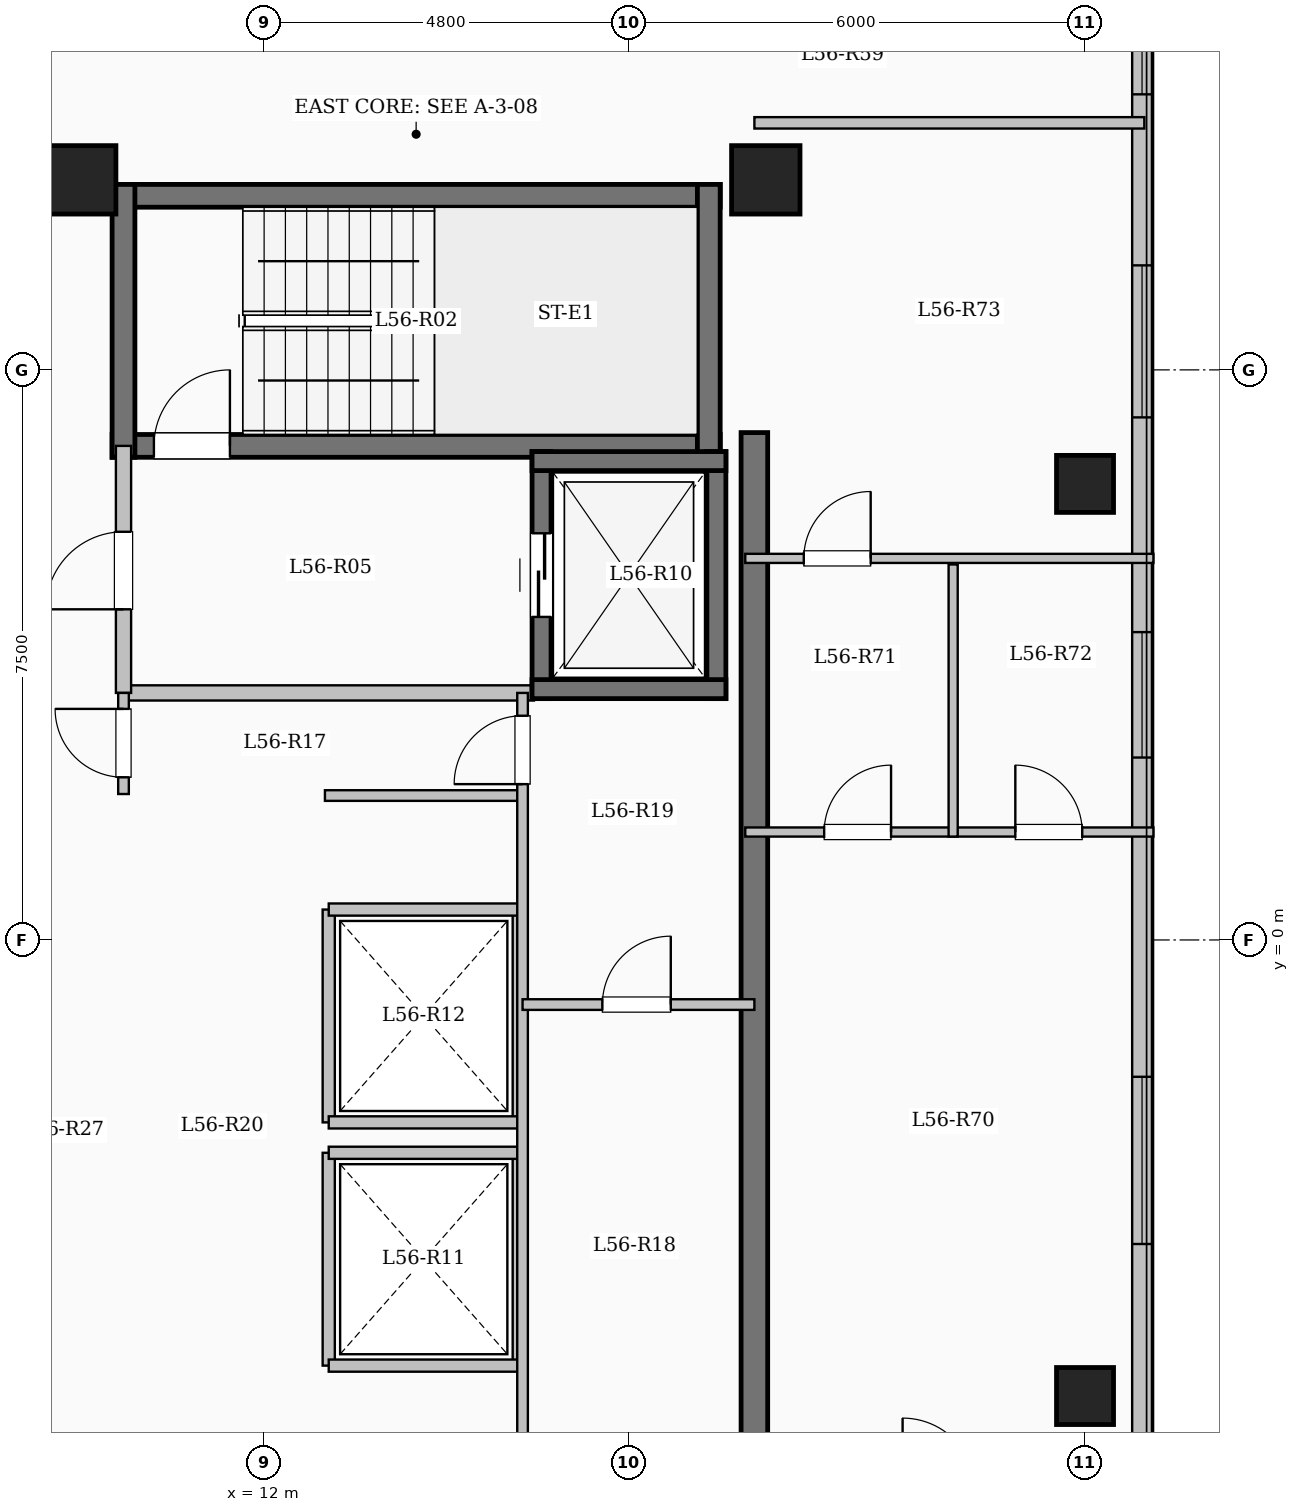
"""IFC4 building model, lengths in metres.
Left out: names, types, materials, properties, quantities, classifications, styles, units other than length and angle.
Written with IfcOpenShell. Run it as: python <this file> out.ifc"""

import sys

from ifc_helpers import new_model, si_unit, direction, frame, frame_2d, origin, origin_2d, place, context, subcontext, project, spatial, rectangle, extrude, element, fill, save


model = new_model("IFC4")
c1 = context("Model", 3, precision=1e-05, world=origin(), true_north=direction((0.0, 1.0)))
c2 = subcontext(c1, "Body", "Model", "MODEL_VIEW")
j1 = project(units=[si_unit("LENGTHUNIT", "METRE"), si_unit("PLANEANGLEUNIT", "RADIAN")], contexts=[c1])
p1 = place(None, origin())
s1 = spatial("IfcSite", under=j1, at=p1, CompositionType="ELEMENT")
p2 = place(p1, origin())
s2 = spatial("IfcBuilding", under=s1, at=p2, CompositionType="ELEMENT")
p3 = place(p2, frame((0.0, 0.0, 207.0)))
s3 = spatial("IfcBuildingStorey", under=s2, at=p3, CompositionType="ELEMENT", Elevation=207.0)
for number, where, z_axis, x_axis in (
    (1, (9.6, 10.0, 0.0), (0.0, 0.0, 1.0), (1.0, 0.0, 0.0)),
    (2, (18.6, 10.0, 0.0), (0.0, 0.0, 1.0), (1.0, 0.0, 0.0)),
):
    element("IfcColumn", number, at=place(p3, frame(where, z_axis=z_axis, x_axis=x_axis)), inside=s3, PredefinedType="COLUMN", context=c2, shape_type="SweptSolid", body=[
        extrude(rectangle(XDim=0.9, YDim=0.9, at=origin_2d()), origin(), (0.0, 0.0, 1.0), 3.35),
    ])
for number, where, z_axis, x_axis in (
    (3, (22.8, -6.0, 0.0), (0.0, 0.0, 1.0), (1.0, 0.0, 0.0)),
    (4, (22.8, 6.0, 0.0), (0.0, 0.0, 1.0), (1.0, 0.0, 0.0)),
):
    element("IfcColumn", number, at=place(p3, frame(where, z_axis=z_axis, x_axis=x_axis)), inside=s3, PredefinedType="COLUMN", context=c2, shape_type="SweptSolid", body=[
        extrude(rectangle(XDim=0.75, YDim=0.75, at=origin_2d()), origin(), (0.0, 0.0, 1.0), 3.35),
    ])
p4 = place(p3, frame((23.55, 17.25, 0.0), z_axis=(0.0, 0.0, 1.0), x_axis=(0.0, -1.0, 0.0)))
e5 = element("IfcWall", 5, at=p4, inside=s3, PredefinedType="SOLIDWALL", context=c2, shape_type="SweptSolid", body=[
    extrude(rectangle(XDim=34.5, YDim=0.26, at=frame_2d((17.25, 0.0))), origin(), (0.0, 0.0, 1.0), 3.1),
])
p5 = place(p4, frame((1.375, 0.0, 0.9)))
e6 = element("IfcOpeningElement", 6, at=p5, cuts=e5, PredefinedType="OPENING", context=c2, shape_type="SweptSolid", body=[
    extrude(rectangle(XDim=2.0, YDim=1.7, at=frame_2d((1.0, 0.85))), frame((0.0, 0.14, 0.0), z_axis=(0.0, -1.0, 0.0), x_axis=(1.0, 0.0, 0.0)), (0.0, 0.0, 1.0), 0.28),
])
p6 = place(p4, frame((5.125, 0.0, 0.95)))
e7 = element("IfcOpeningElement", 7, at=p6, cuts=e5, PredefinedType="OPENING", context=c2, shape_type="SweptSolid", body=[
    extrude(rectangle(XDim=1.0, YDim=1.5, at=frame_2d((0.5, 0.75))), frame((0.0, 0.14, 0.0), z_axis=(0.0, -1.0, 0.0), x_axis=(1.0, 0.0, 0.0)), (0.0, 0.0, 1.0), 0.28),
])
p7 = place(p4, frame((8.375, 0.0, 0.9)))
e8 = element("IfcOpeningElement", 8, at=p7, cuts=e5, PredefinedType="OPENING", context=c2, shape_type="SweptSolid", body=[
    extrude(rectangle(XDim=2.0, YDim=1.7, at=frame_2d((1.0, 0.85))), frame((0.0, 0.14, 0.0), z_axis=(0.0, -1.0, 0.0), x_axis=(1.0, 0.0, 0.0)), (0.0, 0.0, 1.0), 0.28),
])
p8 = place(p4, frame((13.2, 0.0, 0.9)))
e9 = element("IfcOpeningElement", 9, at=p8, cuts=e5, PredefinedType="OPENING", context=c2, shape_type="SweptSolid", body=[
    extrude(rectangle(XDim=1.65, YDim=1.6, at=frame_2d((0.825, 0.8))), frame((0.0, 0.14, 0.0), z_axis=(0.0, -1.0, 0.0), x_axis=(1.0, 0.0, 0.0)), (0.0, 0.0, 1.0), 0.28),
])
p9 = place(p4, frame((19.05, 0.0, 0.9)))
e10 = element("IfcOpeningElement", 10, at=p9, cuts=e5, PredefinedType="OPENING", context=c2, shape_type="SweptSolid", body=[
    extrude(rectangle(XDim=2.2, YDim=1.75, at=frame_2d((1.1, 0.875))), frame((0.0, 0.14, 0.0), z_axis=(0.0, -1.0, 0.0), x_axis=(1.0, 0.0, 0.0)), (0.0, 0.0, 1.0), 0.28),
])
p10 = place(p4, frame((24.975, 0.0, 0.95)))
e11 = element("IfcOpeningElement", 11, at=p10, cuts=e5, PredefinedType="OPENING", context=c2, shape_type="SweptSolid", body=[
    extrude(rectangle(XDim=1.2, YDim=1.5, at=frame_2d((0.6, 0.75))), frame((0.0, 0.14, 0.0), z_axis=(0.0, -1.0, 0.0), x_axis=(1.0, 0.0, 0.0)), (0.0, 0.0, 1.0), 0.28),
])
p11 = place(p4, frame((29.475, 0.0, 0.9)))
e12 = element("IfcOpeningElement", 12, at=p11, cuts=e5, PredefinedType="OPENING", context=c2, shape_type="SweptSolid", body=[
    extrude(rectangle(XDim=2.2, YDim=1.75, at=frame_2d((1.1, 0.875))), frame((0.0, 0.14, 0.0), z_axis=(0.0, -1.0, 0.0), x_axis=(1.0, 0.0, 0.0)), (0.0, 0.0, 1.0), 0.28),
])
p12 = place(p3, frame((10.0, 9.79, 0.0), z_axis=(0.0, 0.0, 1.0), x_axis=(1.0, 0.0, 0.0)))
e13 = element("IfcWall", 13, at=p12, inside=s3, PredefinedType="SHEAR", context=c2, shape_type="SweptSolid", body=[
    extrude(rectangle(XDim=8.0, YDim=0.3, at=frame_2d((4.0, 0.0))), origin(), (0.0, 0.0, 1.0), 3.35),
])
p13 = place(p3, frame((10.0, 6.5, 0.0), z_axis=(0.0, 0.0, 1.0), x_axis=(1.0, 0.0, 0.0)))
e14 = element("IfcWall", 14, at=p13, inside=s3, PredefinedType="SHEAR", context=c2, shape_type="SweptSolid", body=[
    extrude(rectangle(XDim=8.0, YDim=0.3, at=frame_2d((4.0, 0.0))), origin(), (0.0, 0.0, 1.0), 3.35),
])
p14 = place(p13, frame((0.55, 0.0, 0.0)))
e15 = element("IfcOpeningElement", 15, at=p14, cuts=e14, PredefinedType="OPENING", context=c2, shape_type="SweptSolid", body=[
    extrude(rectangle(XDim=1.0, YDim=2.15, at=frame_2d((0.5, 1.075))), frame((0.0, 0.16, 0.0), z_axis=(0.0, -1.0, 0.0), x_axis=(1.0, 0.0, 0.0)), (0.0, 0.0, 1.0), 0.32),
])
for number, where, z_axis, x_axis in (
    (16, (10.15, 6.35, 0.0), (0.0, 0.0, 1.0), (0.0, 1.0, 0.0)),
    (17, (17.85, 6.35, 0.0), (0.0, 0.0, 1.0), (0.0, 1.0, 0.0)),
):
    element("IfcWall", number, at=place(p3, frame(where, z_axis=z_axis, x_axis=x_axis)), inside=s3, PredefinedType="SHEAR", context=c2, shape_type="SweptSolid", body=[
        extrude(rectangle(XDim=3.59, YDim=0.3, at=frame_2d((1.795, 0.0))), origin(), (0.0, 0.0, 1.0), 3.35),
    ])
p15 = place(p3, frame((10.15, 3.25, 0.0), z_axis=(0.0, 0.0, 1.0), x_axis=(1.0, 0.0, 0.0)))
e18 = element("IfcWall", 18, at=p15, inside=s3, PredefinedType="SOLIDWALL", context=c2, shape_type="SweptSolid", body=[
    extrude(rectangle(XDim=5.4, YDim=0.2, at=frame_2d((2.7, 0.0))), origin(), (0.0, 0.0, 1.0), 3.1),
])
p16 = place(p3, frame((10.15, 3.25, 0.0), z_axis=(0.0, 0.0, 1.0), x_axis=(0.0, 1.0, 0.0)))
e19 = element("IfcWall", 19, at=p16, inside=s3, PredefinedType="SOLIDWALL", context=c2, shape_type="SweptSolid", body=[
    extrude(rectangle(XDim=3.25, YDim=0.2, at=frame_2d((1.625, 0.0))), origin(), (0.0, 0.0, 1.0), 3.1),
])
p17 = place(p16, frame((1.1, 0.0, 0.0)))
e20 = element("IfcOpeningElement", 20, at=p17, cuts=e19, PredefinedType="OPENING", context=c2, shape_type="SweptSolid", body=[
    extrude(rectangle(XDim=1.02, YDim=2.15, at=frame_2d((0.51, 1.075))), frame((0.0, 0.11, 0.0), z_axis=(0.0, -1.0, 0.0), x_axis=(1.0, 0.0, 0.0)), (0.0, 0.0, 1.0), 0.22),
])
p18 = place(p3, frame((15.65, 3.175, 0.0), z_axis=(0.0, 0.0, 1.0), x_axis=(0.0, 1.0, 0.0)))
e21 = element("IfcWall", 21, at=p18, inside=s3, PredefinedType="SHEAR", context=c2, shape_type="SweptSolid", body=[
    extrude(rectangle(XDim=3.25, YDim=0.25, at=frame_2d((1.625, 0.0))), origin(), (0.0, 0.0, 1.0), 3.35),
])
p19 = place(p18, frame((1.075, 0.0, 0.0)))
e22 = element("IfcOpeningElement", 22, at=p19, cuts=e21, PredefinedType="OPENING", context=c2, shape_type="SweptSolid", body=[
    extrude(rectangle(XDim=1.1, YDim=2.15, at=frame_2d((0.55, 1.075))), frame((0.0, 0.135, 0.0), z_axis=(0.0, -1.0, 0.0), x_axis=(1.0, 0.0, 0.0)), (0.0, 0.0, 1.0), 0.27),
])
p20 = place(p3, frame((17.95, 3.175, 0.0), z_axis=(0.0, 0.0, 1.0), x_axis=(0.0, 1.0, 0.0)))
e23 = element("IfcWall", 23, at=p20, inside=s3, PredefinedType="SHEAR", context=c2, shape_type="SweptSolid", body=[
    extrude(rectangle(XDim=3.25, YDim=0.25, at=frame_2d((1.625, 0.0))), origin(), (0.0, 0.0, 1.0), 3.35),
])
for number, where, z_axis, x_axis in (
    (24, (15.525, 3.3, 0.0), (0.0, 0.0, 1.0), (1.0, 0.0, 0.0)),
    (25, (15.525, 6.3, 0.0), (0.0, 0.0, 1.0), (1.0, 0.0, 0.0)),
):
    element("IfcWall", number, at=place(p3, frame(where, z_axis=z_axis, x_axis=x_axis)), inside=s3, PredefinedType="SHEAR", context=c2, shape_type="SweptSolid", body=[
        extrude(rectangle(XDim=2.55, YDim=0.25, at=frame_2d((1.275, 0.0))), origin(), (0.0, 0.0, 1.0), 3.35),
    ])
for number, where, z_axis, x_axis in (
    (26, (12.85, -5.6, 0.0), (0.0, 0.0, 1.0), (0.0, 1.0, 0.0)),
    (27, (15.35, -5.6, 0.0), (0.0, 0.0, 1.0), (0.0, 1.0, 0.0)),
):
    element("IfcWall", number, at=place(p3, frame(where, z_axis=z_axis, x_axis=x_axis)), inside=s3, PredefinedType="SOLIDWALL", context=c2, shape_type="SweptSolid", body=[
        extrude(rectangle(XDim=2.8, YDim=0.16, at=frame_2d((1.4, 0.0))), origin(), (0.0, 0.0, 1.0), 3.1),
    ])
for number, where, z_axis, x_axis in (
    (28, (12.85, -5.6, 0.0), (0.0, 0.0, 1.0), (1.0, 0.0, 0.0)),
    (29, (12.85, -2.8, 0.0), (0.0, 0.0, 1.0), (1.0, 0.0, 0.0)),
):
    element("IfcWall", number, at=place(p3, frame(where, z_axis=z_axis, x_axis=x_axis)), inside=s3, PredefinedType="SOLIDWALL", context=c2, shape_type="SweptSolid", body=[
        extrude(rectangle(XDim=2.5, YDim=0.16, at=frame_2d((1.25, 0.0))), origin(), (0.0, 0.0, 1.0), 3.1),
    ])
for number, where, z_axis, x_axis in (
    (30, (12.85, -2.4, 0.0), (0.0, 0.0, 1.0), (0.0, 1.0, 0.0)),
    (31, (15.35, -2.4, 0.0), (0.0, 0.0, 1.0), (0.0, 1.0, 0.0)),
):
    element("IfcWall", number, at=place(p3, frame(where, z_axis=z_axis, x_axis=x_axis)), inside=s3, PredefinedType="SOLIDWALL", context=c2, shape_type="SweptSolid", body=[
        extrude(rectangle(XDim=2.8, YDim=0.16, at=frame_2d((1.4, 0.0))), origin(), (0.0, 0.0, 1.0), 3.1),
    ])
for number, where, z_axis, x_axis in (
    (32, (12.85, -2.4, 0.0), (0.0, 0.0, 1.0), (1.0, 0.0, 0.0)),
    (33, (12.85, 0.4, 0.0), (0.0, 0.0, 1.0), (1.0, 0.0, 0.0)),
):
    element("IfcWall", number, at=place(p3, frame(where, z_axis=z_axis, x_axis=x_axis)), inside=s3, PredefinedType="SOLIDWALL", context=c2, shape_type="SweptSolid", body=[
        extrude(rectangle(XDim=2.5, YDim=0.16, at=frame_2d((1.25, 0.0))), origin(), (0.0, 0.0, 1.0), 3.1),
    ])
p21 = place(p3, frame((18.45, -7.375, 0.0), z_axis=(0.0, 0.0, 1.0), x_axis=(0.0, 1.0, 0.0)))
e34 = element("IfcWall", 34, at=p21, inside=s3, PredefinedType="SHEAR", context=c2, shape_type="SweptSolid", body=[
    extrude(rectangle(XDim=14.05, YDim=0.35, at=frame_2d((7.025, 0.0))), origin(), (0.0, 0.0, 1.0), 3.35),
])
p22 = place(p3, frame((12.8, 1.9, 0.0), z_axis=(0.0, 0.0, 1.0), x_axis=(1.0, 0.0, 0.0)))
e35 = element("IfcWall", 35, at=p22, inside=s3, PredefinedType="PARTITIONING", context=c2, shape_type="SweptSolid", body=[
    extrude(rectangle(XDim=2.6, YDim=0.14, at=frame_2d((1.3, 0.0))), origin(), (0.0, 0.0, 1.0), 3.1),
])
p23 = place(p3, frame((10.15, 1.92, 0.0), z_axis=(0.0, 0.0, 1.0), x_axis=(0.0, 1.0, 0.0)))
e36 = element("IfcWall", 36, at=p23, inside=s3, PredefinedType="PARTITIONING", context=c2, shape_type="SweptSolid", body=[
    extrude(rectangle(XDim=1.33, YDim=0.14, at=frame_2d((0.665, 0.0))), origin(), (0.0, 0.0, 1.0), 3.1),
])
p24 = place(p23, frame((0.22, 0.0, 0.0)))
e37 = element("IfcOpeningElement", 37, at=p24, cuts=e36, PredefinedType="OPENING", context=c2, shape_type="SweptSolid", body=[
    extrude(rectangle(XDim=0.9, YDim=2.08, at=frame_2d((0.45, 1.04))), frame((0.0, 0.08, 0.0), z_axis=(0.0, -1.0, 0.0), x_axis=(1.0, 0.0, 0.0)), (0.0, 0.0, 1.0), 0.16),
])
p25 = place(p3, frame((15.4, -7.2, 0.0), z_axis=(0.0, 0.0, 1.0), x_axis=(0.0, 1.0, 0.0)))
e38 = element("IfcWall", 38, at=p25, inside=s3, PredefinedType="PARTITIONING", context=c2, shape_type="SweptSolid", body=[
    extrude(rectangle(XDim=10.45, YDim=0.14, at=frame_2d((5.225, 0.0))), origin(), (0.0, 0.0, 1.0), 3.1),
])
p26 = place(p25, frame((9.25, 0.0, 0.0)))
e39 = element("IfcOpeningElement", 39, at=p26, cuts=e38, PredefinedType="OPENING", context=c2, shape_type="SweptSolid", body=[
    extrude(rectangle(XDim=0.9, YDim=2.08, at=frame_2d((0.45, 1.04))), frame((0.0, 0.08, 0.0), z_axis=(0.0, -1.0, 0.0), x_axis=(1.0, 0.0, 0.0)), (0.0, 0.0, 1.0), 0.16),
])
p27 = place(p3, frame((15.4, -0.85, 0.0), z_axis=(0.0, 0.0, 1.0), x_axis=(1.0, 0.0, 0.0)))
e40 = element("IfcWall", 40, at=p27, inside=s3, PredefinedType="PARTITIONING", context=c2, shape_type="SweptSolid", body=[
    extrude(rectangle(XDim=3.05, YDim=0.14, at=frame_2d((1.525, 0.0))), origin(), (0.0, 0.0, 1.0), 3.1),
])
p28 = place(p27, frame((1.05, 0.0, 0.0)))
e41 = element("IfcOpeningElement", 41, at=p28, cuts=e40, PredefinedType="OPENING", context=c2, shape_type="SweptSolid", body=[
    extrude(rectangle(XDim=0.9, YDim=2.08, at=frame_2d((0.45, 1.04))), frame((0.0, 0.08, 0.0), z_axis=(0.0, -1.0, 0.0), x_axis=(1.0, 0.0, 0.0)), (0.0, 0.0, 1.0), 0.16),
])
p29 = place(p3, frame((18.45, 10.75, 0.0), z_axis=(0.0, 0.0, 1.0), x_axis=(1.0, 0.0, 0.0)))
e42 = element("IfcWall", 42, at=p29, inside=s3, PredefinedType="PARTITIONING", context=c2, shape_type="SweptSolid", body=[
    extrude(rectangle(XDim=5.13, YDim=0.15, at=frame_2d((2.565, 0.0))), origin(), (0.0, 0.0, 1.0), 3.1),
])
p30 = place(p3, frame((18.33, 1.42, 0.0), z_axis=(0.0, 0.0, 1.0), x_axis=(1.0, 0.0, 0.0)))
e43 = element("IfcWall", 43, at=p30, inside=s3, PredefinedType="PARTITIONING", context=c2, shape_type="SweptSolid", body=[
    extrude(rectangle(XDim=5.37, YDim=0.12, at=frame_2d((2.685, 0.0))), origin(), (0.0, 0.0, 1.0), 3.1),
])
p31 = place(p30, frame((1.038, 0.0, 0.0)))
e44 = element("IfcOpeningElement", 44, at=p31, cuts=e43, PredefinedType="OPENING", context=c2, shape_type="SweptSolid", body=[
    extrude(rectangle(XDim=0.88, YDim=2.1, at=frame_2d((0.44, 1.05))), frame((0.0, 0.07, 0.0), z_axis=(0.0, -1.0, 0.0), x_axis=(1.0, 0.0, 0.0)), (0.0, 0.0, 1.0), 0.14),
])
p32 = place(p30, frame((3.553, 0.0, 0.0)))
e45 = element("IfcOpeningElement", 45, at=p32, cuts=e43, PredefinedType="OPENING", context=c2, shape_type="SweptSolid", body=[
    extrude(rectangle(XDim=0.88, YDim=2.1, at=frame_2d((0.44, 1.05))), frame((0.0, 0.07, 0.0), z_axis=(0.0, -1.0, 0.0), x_axis=(1.0, 0.0, 0.0)), (0.0, 0.0, 1.0), 0.14),
])
p33 = place(p3, frame((18.33, 5.02, 0.0), z_axis=(0.0, 0.0, 1.0), x_axis=(1.0, 0.0, 0.0)))
e46 = element("IfcWall", 46, at=p33, inside=s3, PredefinedType="PARTITIONING", context=c2, shape_type="SweptSolid", body=[
    extrude(rectangle(XDim=5.37, YDim=0.12, at=frame_2d((2.685, 0.0))), origin(), (0.0, 0.0, 1.0), 3.1),
])
p34 = place(p33, frame((0.77, 0.0, 0.0)))
e47 = element("IfcOpeningElement", 47, at=p34, cuts=e46, PredefinedType="OPENING", context=c2, shape_type="SweptSolid", body=[
    extrude(rectangle(XDim=0.88, YDim=2.1, at=frame_2d((0.44, 1.05))), frame((0.0, 0.07, 0.0), z_axis=(0.0, -1.0, 0.0), x_axis=(1.0, 0.0, 0.0)), (0.0, 0.0, 1.0), 0.14),
])
p35 = place(p3, frame((21.065, 1.36, 0.0), z_axis=(0.0, 0.0, 1.0), x_axis=(0.0, 1.0, 0.0)))
e48 = element("IfcWall", 48, at=p35, inside=s3, PredefinedType="PARTITIONING", context=c2, shape_type="SweptSolid", body=[
    extrude(rectangle(XDim=3.58, YDim=0.12, at=frame_2d((1.79, 0.0))), origin(), (0.0, 0.0, 1.0), 3.1),
])
p36 = place(p6, origin())
e49 = element("IfcWindow", 49, at=p36, inside=s3, PartitioningType="SINGLE_PANEL", PredefinedType="WINDOW", context=c2, shape_type="SweptSolid", body=[
    extrude(rectangle(XDim=1.0, YDim=1.5, at=frame_2d((0.5, 0.75))), frame((0.0, 0.03, 0.0), z_axis=(0.0, -1.0, 0.0), x_axis=(1.0, 0.0, 0.0)), (0.0, 0.0, 1.0), 0.06),
])
fill(e7, e49)
p37 = place(p7, origin())
e50 = element("IfcWindow", 50, at=p37, inside=s3, PartitioningType="SINGLE_PANEL", PredefinedType="WINDOW", context=c2, shape_type="SweptSolid", body=[
    extrude(rectangle(XDim=2.0, YDim=1.7, at=frame_2d((1.0, 0.85))), frame((0.0, 0.03, 0.0), z_axis=(0.0, -1.0, 0.0), x_axis=(1.0, 0.0, 0.0)), (0.0, 0.0, 1.0), 0.06),
])
fill(e8, e50)
p38 = place(p8, origin())
e51 = element("IfcWindow", 51, at=p38, inside=s3, PartitioningType="SINGLE_PANEL", PredefinedType="WINDOW", context=c2, shape_type="SweptSolid", body=[
    extrude(rectangle(XDim=1.65, YDim=1.6, at=frame_2d((0.825, 0.8))), frame((0.0, 0.03, 0.0), z_axis=(0.0, -1.0, 0.0), x_axis=(1.0, 0.0, 0.0)), (0.0, 0.0, 1.0), 0.06),
])
fill(e9, e51)
p39 = place(p9, origin())
e52 = element("IfcWindow", 52, at=p39, inside=s3, PartitioningType="SINGLE_PANEL", PredefinedType="WINDOW", context=c2, shape_type="SweptSolid", body=[
    extrude(rectangle(XDim=2.2, YDim=1.75, at=frame_2d((1.1, 0.875))), frame((0.0, 0.03, 0.0), z_axis=(0.0, -1.0, 0.0), x_axis=(1.0, 0.0, 0.0)), (0.0, 0.0, 1.0), 0.06),
])
fill(e10, e52)
p40 = place(p14, origin())
e53 = element("IfcDoor", 53, at=p40, inside=s3, OperationType="SINGLE_SWING_RIGHT", PredefinedType="DOOR", context=c2, shape_type="SweptSolid", body=[
    extrude(rectangle(XDim=1.0, YDim=2.15, at=frame_2d((0.5, 1.075))), frame((0.0, 0.025, 0.0), z_axis=(0.0, -1.0, 0.0), x_axis=(1.0, 0.0, 0.0)), (0.0, 0.0, 1.0), 0.05),
])
fill(e15, e53)
p41 = place(p17, origin())
e54 = element("IfcDoor", 54, at=p41, inside=s3, OperationType="SINGLE_SWING_LEFT", PredefinedType="DOOR", context=c2, shape_type="SweptSolid", body=[
    extrude(rectangle(XDim=1.02, YDim=2.15, at=frame_2d((0.51, 1.075))), frame((0.0, 0.025, 0.0), z_axis=(0.0, -1.0, 0.0), x_axis=(1.0, 0.0, 0.0)), (0.0, 0.0, 1.0), 0.05),
])
fill(e20, e54)
p42 = place(p19, origin())
e55 = element("IfcDoor", 55, at=p42, inside=s3, OperationType="SLIDING_TO_LEFT", PredefinedType="DOOR", context=c2, shape_type="SweptSolid", body=[
    extrude(rectangle(XDim=1.1, YDim=2.15, at=frame_2d((0.55, 1.075))), frame((0.0, 0.025, 0.0), z_axis=(0.0, -1.0, 0.0), x_axis=(1.0, 0.0, 0.0)), (0.0, 0.0, 1.0), 0.05),
])
fill(e22, e55)
p43 = place(p24, origin())
e56 = element("IfcDoor", 56, at=p43, inside=s3, OperationType="SINGLE_SWING_RIGHT", PredefinedType="DOOR", context=c2, shape_type="SweptSolid", body=[
    extrude(rectangle(XDim=0.9, YDim=2.08, at=frame_2d((0.45, 1.04))), frame((0.0, 0.025, 0.0), z_axis=(0.0, -1.0, 0.0), x_axis=(1.0, 0.0, 0.0)), (0.0, 0.0, 1.0), 0.05),
])
fill(e37, e56)
p44 = place(p26, origin())
e57 = element("IfcDoor", 57, at=p44, inside=s3, OperationType="SINGLE_SWING_LEFT", PredefinedType="DOOR", context=c2, shape_type="SweptSolid", body=[
    extrude(rectangle(XDim=0.9, YDim=2.08, at=frame_2d((0.45, 1.04))), frame((0.0, 0.025, 0.0), z_axis=(0.0, -1.0, 0.0), x_axis=(1.0, 0.0, 0.0)), (0.0, 0.0, 1.0), 0.05),
])
fill(e39, e57)
p45 = place(p28, origin())
e58 = element("IfcDoor", 58, at=p45, inside=s3, OperationType="SINGLE_SWING_RIGHT", PredefinedType="DOOR", context=c2, shape_type="SweptSolid", body=[
    extrude(rectangle(XDim=0.9, YDim=2.08, at=frame_2d((0.45, 1.04))), frame((0.0, 0.025, 0.0), z_axis=(0.0, -1.0, 0.0), x_axis=(1.0, 0.0, 0.0)), (0.0, 0.0, 1.0), 0.05),
])
fill(e41, e58)
p46 = place(p31, origin())
e59 = element("IfcDoor", 59, at=p46, inside=s3, OperationType="SINGLE_SWING_RIGHT", PredefinedType="DOOR", context=c2, shape_type="SweptSolid", body=[
    extrude(rectangle(XDim=0.88, YDim=2.1, at=frame_2d((0.44, 1.05))), frame((0.0, 0.025, 0.0), z_axis=(0.0, -1.0, 0.0), x_axis=(1.0, 0.0, 0.0)), (0.0, 0.0, 1.0), 0.05),
])
fill(e44, e59)
p47 = place(p32, origin())
e60 = element("IfcDoor", 60, at=p47, inside=s3, OperationType="SINGLE_SWING_LEFT", PredefinedType="DOOR", context=c2, shape_type="SweptSolid", body=[
    extrude(rectangle(XDim=0.88, YDim=2.1, at=frame_2d((0.44, 1.05))), frame((0.0, 0.025, 0.0), z_axis=(0.0, -1.0, 0.0), x_axis=(1.0, 0.0, 0.0)), (0.0, 0.0, 1.0), 0.05),
])
fill(e45, e60)
p48 = place(p34, origin())
e61 = element("IfcDoor", 61, at=p48, inside=s3, OperationType="SINGLE_SWING_RIGHT", PredefinedType="DOOR", context=c2, shape_type="SweptSolid", body=[
    extrude(rectangle(XDim=0.88, YDim=2.1, at=frame_2d((0.44, 1.05))), frame((0.0, 0.025, 0.0), z_axis=(0.0, -1.0, 0.0), x_axis=(1.0, 0.0, 0.0)), (0.0, 0.0, 1.0), 0.05),
])
fill(e47, e61)
save(model, sys.argv[1])
